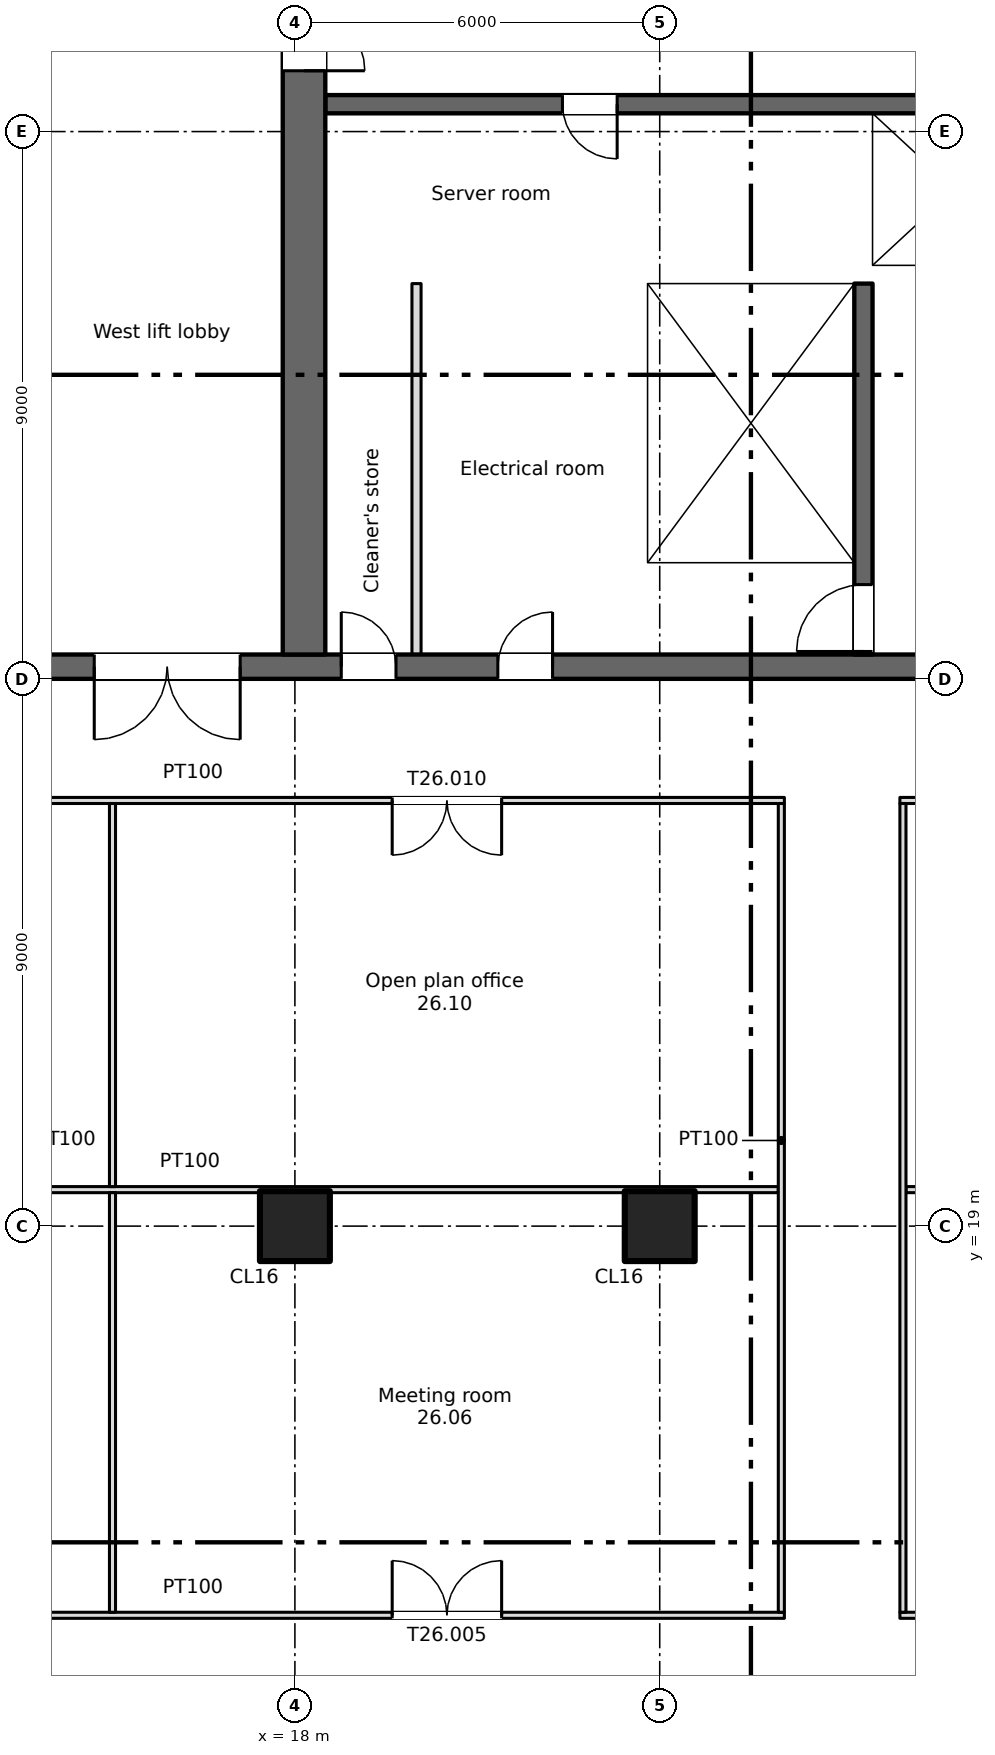
"""IFC4 building model, lengths in metres.
Left out: names, types, materials, properties, quantities, classifications, styles, units other than length and angle.
Written with IfcOpenShell. Run it as: python <this file> out.ifc"""

import sys

from ifc_helpers import new_model, si_unit, direction, frame, frame_2d, origin, origin_2d, place, context, subcontext, project, spatial, rectangle, extrude, element, fill, save


model = new_model("IFC4")
c1 = context("Model", 3, precision=1e-05, world=origin(), true_north=direction((0.0, 1.0)))
c2 = subcontext(c1, "Body", "Model", "MODEL_VIEW")
j1 = project(units=[si_unit("LENGTHUNIT", "METRE"), si_unit("PLANEANGLEUNIT", "RADIAN")], contexts=[c1])
p1 = place(None, origin())
s1 = spatial("IfcSite", under=j1, at=p1, CompositionType="ELEMENT")
p2 = place(p1, origin())
s2 = spatial("IfcBuilding", under=s1, at=p2, CompositionType="ELEMENT")
p3 = place(p2, frame((0.0, 0.0, 178.0)))
s3 = spatial("IfcBuildingStorey", under=s2, at=p3, CompositionType="ELEMENT", Elevation=178.0)
for number, where, z_axis, x_axis in (
    (1, (18.0, 19.0, 0.0), (0.0, 0.0, 1.0), (1.0, 0.0, 0.0)),
    (2, (24.0, 19.0, 0.0), (0.0, 0.0, 1.0), (1.0, 0.0, 0.0)),
):
    element("IfcColumn", number, at=place(p3, frame(where, z_axis=z_axis, x_axis=x_axis)), inside=s3, PredefinedType="COLUMN", context=c2, shape_type="SweptSolid", body=[
        extrude(rectangle(XDim=1.15, YDim=1.15, at=origin_2d()), origin(), (0.0, 0.0, 1.0), 3.35),
    ])
p4 = place(p3, frame((6.6, 28.2, 0.0), z_axis=(0.0, 0.0, 1.0), x_axis=(1.0, 0.0, 0.0)))
e3 = element("IfcWall", 3, at=p4, inside=s3, PredefinedType="SHEAR", context=c2, shape_type="SweptSolid", body=[
    extrude(rectangle(XDim=57.9, YDim=0.4, at=frame_2d((28.95, 0.0))), origin(), (0.0, 0.0, 1.0), 3.35),
])
p5 = place(p4, frame((12.163, 0.0, 0.0)))
e4 = element("IfcOpeningElement", 4, at=p5, cuts=e3, PredefinedType="OPENING", context=c2, shape_type="SweptSolid", body=[
    extrude(rectangle(XDim=0.9, YDim=2.1, at=frame_2d((0.45, 1.05))), frame((0.0, 0.21, 0.0), z_axis=(0.0, -1.0, 0.0), x_axis=(1.0, 0.0, 0.0)), (0.0, 0.0, 1.0), 0.42),
])
p6 = place(p4, frame((14.738, 0.0, 0.0)))
e5 = element("IfcOpeningElement", 5, at=p6, cuts=e3, PredefinedType="OPENING", context=c2, shape_type="SweptSolid", body=[
    extrude(rectangle(XDim=0.9, YDim=2.1, at=frame_2d((0.45, 1.05))), frame((0.0, 0.21, 0.0), z_axis=(0.0, -1.0, 0.0), x_axis=(1.0, 0.0, 0.0)), (0.0, 0.0, 1.0), 0.42),
])
p7 = place(p4, frame((49.163, 0.0, 0.0)))
e6 = element("IfcOpeningElement", 6, at=p7, cuts=e3, PredefinedType="OPENING", context=c2, shape_type="SweptSolid", body=[
    extrude(rectangle(XDim=0.9, YDim=2.1, at=frame_2d((0.45, 1.05))), frame((0.0, 0.21, 0.0), z_axis=(0.0, -1.0, 0.0), x_axis=(1.0, 0.0, 0.0)), (0.0, 0.0, 1.0), 0.42),
])
p8 = place(p4, frame((51.738, 0.0, 0.0)))
e7 = element("IfcOpeningElement", 7, at=p8, cuts=e3, PredefinedType="OPENING", context=c2, shape_type="SweptSolid", body=[
    extrude(rectangle(XDim=0.9, YDim=2.1, at=frame_2d((0.45, 1.05))), frame((0.0, 0.21, 0.0), z_axis=(0.0, -1.0, 0.0), x_axis=(1.0, 0.0, 0.0)), (0.0, 0.0, 1.0), 0.42),
])
p9 = place(p4, frame((1.45, 0.0, 0.0)))
e8 = element("IfcOpeningElement", 8, at=p9, cuts=e3, PredefinedType="OPENING", context=c2, shape_type="SweptSolid", body=[
    extrude(rectangle(XDim=0.9, YDim=2.1, at=frame_2d((0.45, 1.05))), frame((0.0, 0.21, 0.0), z_axis=(0.0, -1.0, 0.0), x_axis=(1.0, 0.0, 0.0)), (0.0, 0.0, 1.0), 0.42),
])
p10 = place(p4, frame((4.8, 0.0, 0.0)))
e9 = element("IfcOpeningElement", 9, at=p10, cuts=e3, PredefinedType="OPENING", context=c2, shape_type="SweptSolid", body=[
    extrude(rectangle(XDim=1.2, YDim=2.1, at=frame_2d((0.6, 1.05))), frame((0.0, 0.21, 0.0), z_axis=(0.0, -1.0, 0.0), x_axis=(1.0, 0.0, 0.0)), (0.0, 0.0, 1.0), 0.42),
])
p11 = place(p4, frame((31.8, 0.0, 0.0)))
e10 = element("IfcOpeningElement", 10, at=p11, cuts=e3, PredefinedType="OPENING", context=c2, shape_type="SweptSolid", body=[
    extrude(rectangle(XDim=1.2, YDim=2.1, at=frame_2d((0.6, 1.05))), frame((0.0, 0.21, 0.0), z_axis=(0.0, -1.0, 0.0), x_axis=(1.0, 0.0, 0.0)), (0.0, 0.0, 1.0), 0.42),
])
p12 = place(p4, frame((55.3, 0.0, 0.0)))
e11 = element("IfcOpeningElement", 11, at=p12, cuts=e3, PredefinedType="OPENING", context=c2, shape_type="SweptSolid", body=[
    extrude(rectangle(XDim=1.2, YDim=2.1, at=frame_2d((0.6, 1.05))), frame((0.0, 0.21, 0.0), z_axis=(0.0, -1.0, 0.0), x_axis=(1.0, 0.0, 0.0)), (0.0, 0.0, 1.0), 0.42),
])
p13 = place(p4, frame((21.8, 0.0, 0.0)))
e12 = element("IfcOpeningElement", 12, at=p13, cuts=e3, PredefinedType="OPENING", context=c2, shape_type="SweptSolid", body=[
    extrude(rectangle(XDim=1.2, YDim=2.1, at=frame_2d((0.6, 1.05))), frame((0.0, 0.21, 0.0), z_axis=(0.0, -1.0, 0.0), x_axis=(1.0, 0.0, 0.0)), (0.0, 0.0, 1.0), 0.42),
])
p14 = place(p4, frame((41.8, 0.0, 0.0)))
e13 = element("IfcOpeningElement", 13, at=p14, cuts=e3, PredefinedType="OPENING", context=c2, shape_type="SweptSolid", body=[
    extrude(rectangle(XDim=1.2, YDim=2.1, at=frame_2d((0.6, 1.05))), frame((0.0, 0.21, 0.0), z_axis=(0.0, -1.0, 0.0), x_axis=(1.0, 0.0, 0.0)), (0.0, 0.0, 1.0), 0.42),
])
p15 = place(p4, frame((24.95, 0.0, 0.0)))
e14 = element("IfcOpeningElement", 14, at=p15, cuts=e3, PredefinedType="OPENING", context=c2, shape_type="SweptSolid", body=[
    extrude(rectangle(XDim=2.4, YDim=2.1, at=frame_2d((1.2, 1.05))), frame((0.0, 0.21, 0.0), z_axis=(0.0, -1.0, 0.0), x_axis=(1.0, 0.0, 0.0)), (0.0, 0.0, 1.0), 0.42),
])
p16 = place(p4, frame((37.45, 0.0, 0.0)))
e15 = element("IfcOpeningElement", 15, at=p16, cuts=e3, PredefinedType="OPENING", context=c2, shape_type="SweptSolid", body=[
    extrude(rectangle(XDim=2.4, YDim=2.1, at=frame_2d((1.2, 1.05))), frame((0.0, 0.21, 0.0), z_axis=(0.0, -1.0, 0.0), x_axis=(1.0, 0.0, 0.0)), (0.0, 0.0, 1.0), 0.42),
])
p17 = place(p4, frame((8.1, 0.0, 0.0)))
e16 = element("IfcOpeningElement", 16, at=p17, cuts=e3, PredefinedType="OPENING", context=c2, shape_type="SweptSolid", body=[
    extrude(rectangle(XDim=2.4, YDim=2.1, at=frame_2d((1.2, 1.05))), frame((0.0, 0.21, 0.0), z_axis=(0.0, -1.0, 0.0), x_axis=(1.0, 0.0, 0.0)), (0.0, 0.0, 1.0), 0.42),
])
p18 = place(p4, frame((28.95, 0.0, 0.0)))
e17 = element("IfcOpeningElement", 17, at=p18, cuts=e3, PredefinedType="OPENING", context=c2, shape_type="SweptSolid", body=[
    extrude(rectangle(XDim=0.9, YDim=2.1, at=frame_2d((0.45, 1.05))), frame((0.0, 0.21, 0.0), z_axis=(0.0, -1.0, 0.0), x_axis=(1.0, 0.0, 0.0)), (0.0, 0.0, 1.0), 0.42),
])
p19 = place(p4, frame((34.95, 0.0, 0.0)))
e18 = element("IfcOpeningElement", 18, at=p19, cuts=e3, PredefinedType="OPENING", context=c2, shape_type="SweptSolid", body=[
    extrude(rectangle(XDim=0.9, YDim=2.1, at=frame_2d((0.45, 1.05))), frame((0.0, 0.21, 0.0), z_axis=(0.0, -1.0, 0.0), x_axis=(1.0, 0.0, 0.0)), (0.0, 0.0, 1.0), 0.42),
])
p20 = place(p3, frame((18.15, 28.4, 0.0), z_axis=(0.0, 0.0, 1.0), x_axis=(0.0, 1.0, 0.0)))
e19 = element("IfcWall", 19, at=p20, inside=s3, PredefinedType="SHEAR", context=c2, shape_type="SweptSolid", body=[
    extrude(rectangle(XDim=16.9, YDim=0.7, at=frame_2d((8.45, 0.0))), origin(), (0.0, 0.0, 1.0), 3.35),
])
p21 = place(p20, frame((9.6, 0.0, 0.0)))
e20 = element("IfcOpeningElement", 20, at=p21, cuts=e19, PredefinedType="OPENING", context=c2, shape_type="SweptSolid", body=[
    extrude(rectangle(XDim=2.0, YDim=2.1, at=frame_2d((1.0, 1.05))), frame((0.0, 0.36, 0.0), z_axis=(0.0, -1.0, 0.0), x_axis=(1.0, 0.0, 0.0)), (0.0, 0.0, 1.0), 0.72),
])
p22 = place(p20, frame((15.4, 0.0, 0.0)))
e21 = element("IfcOpeningElement", 21, at=p22, cuts=e19, PredefinedType="OPENING", context=c2, shape_type="SweptSolid", body=[
    extrude(rectangle(XDim=1.2, YDim=2.1, at=frame_2d((0.6, 1.05))), frame((0.0, 0.36, 0.0), z_axis=(0.0, -1.0, 0.0), x_axis=(1.0, 0.0, 0.0)), (0.0, 0.0, 1.0), 0.72),
])
for number, where, z_axis, x_axis in (
    (22, (13.85, 28.4, 0.0), (0.0, 0.0, 1.0), (0.0, 1.0, 0.0)),
    (23, (23.65, 28.4, 0.0), (0.0, 0.0, 1.0), (0.0, 1.0, 0.0)),
):
    element("IfcWall", number, at=place(p3, frame(where, z_axis=z_axis, x_axis=x_axis)), inside=s3, PredefinedType="SHEAR", context=c2, shape_type="SweptSolid", body=[
        extrude(rectangle(XDim=6.1, YDim=0.3, at=frame_2d((3.05, 0.0))), origin(), (0.0, 0.0, 1.0), 3.35),
    ])
p23 = place(p3, frame((27.35, 28.4, 0.0), z_axis=(0.0, 0.0, 1.0), x_axis=(0.0, 1.0, 0.0)))
e24 = element("IfcWall", 24, at=p23, inside=s3, PredefinedType="SHEAR", context=c2, shape_type="SweptSolid", body=[
    extrude(rectangle(XDim=6.1, YDim=0.3, at=frame_2d((3.05, 0.0))), origin(), (0.0, 0.0, 1.0), 3.35),
])
p24 = place(p23, frame((0.05, 0.0, 0.0)))
e25 = element("IfcOpeningElement", 25, at=p24, cuts=e24, PredefinedType="OPENING", context=c2, shape_type="SweptSolid", body=[
    extrude(rectangle(XDim=1.1, YDim=2.1, at=frame_2d((0.55, 1.05))), frame((0.0, 0.16, 0.0), z_axis=(0.0, -1.0, 0.0), x_axis=(1.0, 0.0, 0.0)), (0.0, 0.0, 1.0), 0.32),
])
p25 = place(p3, frame((18.5, 34.65, 0.0), z_axis=(0.0, 0.0, 1.0), x_axis=(1.0, 0.0, 0.0)))
e26 = element("IfcWall", 26, at=p25, inside=s3, PredefinedType="SHEAR", context=c2, shape_type="SweptSolid", body=[
    extrude(rectangle(XDim=12.2, YDim=0.3, at=frame_2d((6.1, 0.0))), origin(), (0.0, 0.0, 1.0), 3.35),
])
p26 = place(p25, frame((9.8, 0.0, 0.0)))
e27 = element("IfcOpeningElement", 27, at=p26, cuts=e26, PredefinedType="OPENING", context=c2, shape_type="SweptSolid", body=[
    extrude(rectangle(XDim=1.1, YDim=2.1, at=frame_2d((0.55, 1.05))), frame((0.0, 0.16, 0.0), z_axis=(0.0, -1.0, 0.0), x_axis=(1.0, 0.0, 0.0)), (0.0, 0.0, 1.0), 0.32),
])
p27 = place(p3, frame((30.7, 37.45, 0.0), z_axis=(0.0, 0.0, 1.0), x_axis=(-1.0, 0.0, 0.0)))
e28 = element("IfcWall", 28, at=p27, inside=s3, PredefinedType="SHEAR", context=c2, shape_type="SweptSolid", body=[
    extrude(rectangle(XDim=12.2, YDim=0.3, at=frame_2d((6.1, 0.0))), origin(), (0.0, 0.0, 1.0), 3.35),
])
p28 = place(p27, frame((7.4, 0.0, 0.0)))
e29 = element("IfcOpeningElement", 29, at=p28, cuts=e28, PredefinedType="OPENING", context=c2, shape_type="SweptSolid", body=[
    extrude(rectangle(XDim=0.9, YDim=2.1, at=frame_2d((0.45, 1.05))), frame((0.0, 0.16, 0.0), z_axis=(0.0, -1.0, 0.0), x_axis=(1.0, 0.0, 0.0)), (0.0, 0.0, 1.0), 0.32),
])
for number, where, z_axis, x_axis in (
    (30, (27.35, 34.8, 0.0), (0.0, 0.0, 1.0), (0.0, 1.0, 0.0)),
    (31, (13.85, 34.8, 0.0), (0.0, 0.0, 1.0), (0.0, 1.0, 0.0)),
):
    element("IfcWall", number, at=place(p3, frame(where, z_axis=z_axis, x_axis=x_axis)), inside=s3, PredefinedType="SHEAR", context=c2, shape_type="SweptSolid", body=[
        extrude(rectangle(XDim=2.5, YDim=0.3, at=frame_2d((1.25, 0.0))), origin(), (0.0, 0.0, 1.0), 3.35),
    ])
p29 = place(p3, frame((20.0, 28.4, 0.0), z_axis=(0.0, 0.0, 1.0), x_axis=(0.0, 1.0, 0.0)))
e32 = element("IfcWall", 32, at=p29, inside=s3, PredefinedType="PARTITIONING", context=c2, shape_type="SweptSolid", body=[
    extrude(rectangle(XDim=6.1, YDim=0.15, at=frame_2d((3.05, 0.0))), origin(), (0.0, 0.0, 1.0), 3.35),
])
p30 = place(p3, frame((6.6, 12.6, 0.0), z_axis=(0.0, 0.0, 1.0), x_axis=(1.0, 0.0, 0.0)))
e33 = element("IfcWall", 33, at=p30, inside=s3, PredefinedType="PARTITIONING", context=c2, shape_type="SweptSolid", body=[
    extrude(rectangle(XDim=19.45, YDim=0.1, at=frame_2d((9.725, 0.0))), origin(), (0.0, 0.0, 1.0), 3.35),
])
p31 = place(p30, frame((3.7, 0.0, 0.0)))
e34 = element("IfcOpeningElement", 34, at=p31, cuts=e33, PredefinedType="OPENING", context=c2, shape_type="SweptSolid", body=[
    extrude(rectangle(XDim=1.0, YDim=2.1, at=frame_2d((0.5, 1.05))), frame((0.0, 0.06, 0.0), z_axis=(0.0, -1.0, 0.0), x_axis=(1.0, 0.0, 0.0)), (0.0, 0.0, 1.0), 0.12),
])
p32 = place(p30, frame((13.0, 0.0, 0.0)))
e35 = element("IfcOpeningElement", 35, at=p32, cuts=e33, PredefinedType="OPENING", context=c2, shape_type="SweptSolid", body=[
    extrude(rectangle(XDim=1.8, YDim=2.1, at=frame_2d((0.9, 1.05))), frame((0.0, 0.06, 0.0), z_axis=(0.0, -1.0, 0.0), x_axis=(1.0, 0.0, 0.0)), (0.0, 0.0, 1.0), 0.12),
])
p33 = place(p3, frame((27.95, 12.6, 0.0), z_axis=(0.0, 0.0, 1.0), x_axis=(1.0, 0.0, 0.0)))
e36 = element("IfcWall", 36, at=p33, inside=s3, PredefinedType="PARTITIONING", context=c2, shape_type="SweptSolid", body=[
    extrude(rectangle(XDim=22.1, YDim=0.1, at=frame_2d((11.05, 0.0))), origin(), (0.0, 0.0, 1.0), 3.35),
])
p34 = place(p33, frame((4.95, 0.0, 0.0)))
e37 = element("IfcOpeningElement", 37, at=p34, cuts=e36, PredefinedType="OPENING", context=c2, shape_type="SweptSolid", body=[
    extrude(rectangle(XDim=1.2, YDim=2.1, at=frame_2d((0.6, 1.05))), frame((0.0, 0.06, 0.0), z_axis=(0.0, -1.0, 0.0), x_axis=(1.0, 0.0, 0.0)), (0.0, 0.0, 1.0), 0.12),
])
p35 = place(p33, frame((15.95, 0.0, 0.0)))
e38 = element("IfcOpeningElement", 38, at=p35, cuts=e36, PredefinedType="OPENING", context=c2, shape_type="SweptSolid", body=[
    extrude(rectangle(XDim=1.2, YDim=2.1, at=frame_2d((0.6, 1.05))), frame((0.0, 0.06, 0.0), z_axis=(0.0, -1.0, 0.0), x_axis=(1.0, 0.0, 0.0)), (0.0, 0.0, 1.0), 0.12),
])
p36 = place(p3, frame((6.6, 19.6, 0.0), z_axis=(0.0, 0.0, 1.0), x_axis=(1.0, 0.0, 0.0)))
e39 = element("IfcWall", 39, at=p36, inside=s3, PredefinedType="PARTITIONING", context=c2, shape_type="SweptSolid", body=[
    extrude(rectangle(XDim=19.35, YDim=0.1, at=frame_2d((9.675, 0.0))), origin(), (0.0, 0.0, 1.0), 3.35),
])
p37 = place(p3, frame((28.05, 19.6, 0.0), z_axis=(0.0, 0.0, 1.0), x_axis=(1.0, 0.0, 0.0)))
e40 = element("IfcWall", 40, at=p37, inside=s3, PredefinedType="PARTITIONING", context=c2, shape_type="SweptSolid", body=[
    extrude(rectangle(XDim=21.9, YDim=0.1, at=frame_2d((10.95, 0.0))), origin(), (0.0, 0.0, 1.0), 3.35),
])
p38 = place(p3, frame((6.6, 26.0, 0.0), z_axis=(0.0, 0.0, 1.0), x_axis=(1.0, 0.0, 0.0)))
e41 = element("IfcWall", 41, at=p38, inside=s3, PredefinedType="PARTITIONING", context=c2, shape_type="SweptSolid", body=[
    extrude(rectangle(XDim=19.45, YDim=0.1, at=frame_2d((9.725, 0.0))), origin(), (0.0, 0.0, 1.0), 3.35),
])
p39 = place(p38, frame((3.7, 0.0, 0.0)))
e42 = element("IfcOpeningElement", 42, at=p39, cuts=e41, PredefinedType="OPENING", context=c2, shape_type="SweptSolid", body=[
    extrude(rectangle(XDim=1.0, YDim=2.1, at=frame_2d((0.5, 1.05))), frame((0.0, 0.06, 0.0), z_axis=(0.0, -1.0, 0.0), x_axis=(1.0, 0.0, 0.0)), (0.0, 0.0, 1.0), 0.12),
])
p40 = place(p38, frame((13.0, 0.0, 0.0)))
e43 = element("IfcOpeningElement", 43, at=p40, cuts=e41, PredefinedType="OPENING", context=c2, shape_type="SweptSolid", body=[
    extrude(rectangle(XDim=1.8, YDim=2.1, at=frame_2d((0.9, 1.05))), frame((0.0, 0.06, 0.0), z_axis=(0.0, -1.0, 0.0), x_axis=(1.0, 0.0, 0.0)), (0.0, 0.0, 1.0), 0.12),
])
p41 = place(p3, frame((27.95, 26.0, 0.0), z_axis=(0.0, 0.0, 1.0), x_axis=(1.0, 0.0, 0.0)))
e44 = element("IfcWall", 44, at=p41, inside=s3, PredefinedType="PARTITIONING", context=c2, shape_type="SweptSolid", body=[
    extrude(rectangle(XDim=22.1, YDim=0.1, at=frame_2d((11.05, 0.0))), origin(), (0.0, 0.0, 1.0), 3.35),
])
p42 = place(p41, frame((10.15, 0.0, 0.0)))
e45 = element("IfcOpeningElement", 45, at=p42, cuts=e44, PredefinedType="OPENING", context=c2, shape_type="SweptSolid", body=[
    extrude(rectangle(XDim=1.8, YDim=2.1, at=frame_2d((0.9, 1.05))), frame((0.0, 0.06, 0.0), z_axis=(0.0, -1.0, 0.0), x_axis=(1.0, 0.0, 0.0)), (0.0, 0.0, 1.0), 0.12),
])
p43 = place(p3, frame((15.0, 12.65, 0.0), z_axis=(0.0, 0.0, 1.0), x_axis=(0.0, 1.0, 0.0)))
e46 = element("IfcWall", 46, at=p43, inside=s3, PredefinedType="PARTITIONING", context=c2, shape_type="SweptSolid", body=[
    extrude(rectangle(XDim=6.9, YDim=0.1, at=frame_2d((3.45, 0.0))), origin(), (0.0, 0.0, 1.0), 3.35),
])
p44 = place(p3, frame((15.0, 19.65, 0.0), z_axis=(0.0, 0.0, 1.0), x_axis=(0.0, 1.0, 0.0)))
e47 = element("IfcWall", 47, at=p44, inside=s3, PredefinedType="PARTITIONING", context=c2, shape_type="SweptSolid", body=[
    extrude(rectangle(XDim=6.3, YDim=0.1, at=frame_2d((3.15, 0.0))), origin(), (0.0, 0.0, 1.0), 3.35),
])
for number, where, z_axis, x_axis in (
    (48, (26.0, 12.65, 0.0), (0.0, 0.0, 1.0), (0.0, 1.0, 0.0)),
    (49, (28.0, 12.65, 0.0), (0.0, 0.0, 1.0), (0.0, 1.0, 0.0)),
):
    element("IfcWall", number, at=place(p3, frame(where, z_axis=z_axis, x_axis=x_axis)), inside=s3, PredefinedType="PARTITIONING", context=c2, shape_type="SweptSolid", body=[
        extrude(rectangle(XDim=13.3, YDim=0.1, at=frame_2d((6.65, 0.0))), origin(), (0.0, 0.0, 1.0), 3.35),
    ])
p45 = place(p5, origin())
e50 = element("IfcDoor", 50, at=p45, inside=s3, OperationType="SINGLE_SWING_LEFT", PredefinedType="DOOR", context=c2, shape_type="SweptSolid", body=[
    extrude(rectangle(XDim=0.9, YDim=2.1, at=frame_2d((0.45, 1.05))), frame((0.0, 0.025, 0.0), z_axis=(0.0, -1.0, 0.0), x_axis=(1.0, 0.0, 0.0)), (0.0, 0.0, 1.0), 0.05),
])
fill(e4, e50)
p46 = place(p6, origin())
e51 = element("IfcDoor", 51, at=p46, inside=s3, OperationType="SINGLE_SWING_RIGHT", PredefinedType="DOOR", context=c2, shape_type="SweptSolid", body=[
    extrude(rectangle(XDim=0.9, YDim=2.1, at=frame_2d((0.45, 1.05))), frame((0.0, 0.025, 0.0), z_axis=(0.0, -1.0, 0.0), x_axis=(1.0, 0.0, 0.0)), (0.0, 0.0, 1.0), 0.05),
])
fill(e5, e51)
p47 = place(p28, origin())
e52 = element("IfcDoor", 52, at=p47, inside=s3, OperationType="SINGLE_SWING_LEFT", PredefinedType="DOOR", context=c2, shape_type="SweptSolid", body=[
    extrude(rectangle(XDim=0.9, YDim=2.1, at=frame_2d((0.45, 1.05))), frame((0.0, 0.025, 0.0), z_axis=(0.0, -1.0, 0.0), x_axis=(1.0, 0.0, 0.0)), (0.0, 0.0, 1.0), 0.05),
])
fill(e29, e52)
p48 = place(p24, origin())
e53 = element("IfcDoor", 53, at=p48, inside=s3, OperationType="SINGLE_SWING_LEFT", PredefinedType="DOOR", context=c2, shape_type="SweptSolid", body=[
    extrude(rectangle(XDim=1.1, YDim=2.1, at=frame_2d((0.55, 1.05))), frame((0.0, 0.025, 0.0), z_axis=(0.0, -1.0, 0.0), x_axis=(1.0, 0.0, 0.0)), (0.0, 0.0, 1.0), 0.05),
])
fill(e25, e53)
p49 = place(p17, origin())
e54 = element("IfcDoor", 54, at=p49, inside=s3, OperationType="DOUBLE_DOOR_SINGLE_SWING", PredefinedType="DOOR", context=c2, shape_type="SweptSolid", body=[
    extrude(rectangle(XDim=2.4, YDim=2.1, at=frame_2d((1.2, 1.05))), frame((0.0, 0.025, 0.0), z_axis=(0.0, -1.0, 0.0), x_axis=(1.0, 0.0, 0.0)), (0.0, 0.0, 1.0), 0.05),
])
fill(e16, e54)
p50 = place(p21, origin())
e55 = element("IfcDoor", 55, at=p50, inside=s3, OperationType="DOUBLE_DOOR_SINGLE_SWING", PredefinedType="DOOR", context=c2, shape_type="SweptSolid", body=[
    extrude(rectangle(XDim=2.0, YDim=2.1, at=frame_2d((1.0, 1.05))), frame((0.0, 0.025, 0.0), z_axis=(0.0, -1.0, 0.0), x_axis=(1.0, 0.0, 0.0)), (0.0, 0.0, 1.0), 0.05),
])
fill(e20, e55)
p51 = place(p32, origin())
e56 = element("IfcDoor", 56, at=p51, inside=s3, OperationType="DOUBLE_DOOR_SINGLE_SWING", PredefinedType="DOOR", context=c2, shape_type="SweptSolid", body=[
    extrude(rectangle(XDim=1.8, YDim=2.1, at=frame_2d((0.9, 1.05))), frame((0.0, 0.025, 0.0), z_axis=(0.0, -1.0, 0.0), x_axis=(1.0, 0.0, 0.0)), (0.0, 0.0, 1.0), 0.05),
])
fill(e35, e56)
p52 = place(p40, origin())
e57 = element("IfcDoor", 57, at=p52, inside=s3, OperationType="DOUBLE_DOOR_SINGLE_SWING", PredefinedType="DOOR", context=c2, shape_type="SweptSolid", body=[
    extrude(rectangle(XDim=1.8, YDim=2.1, at=frame_2d((0.9, 1.05))), frame((0.0, 0.025, 0.0), z_axis=(0.0, -1.0, 0.0), x_axis=(1.0, 0.0, 0.0)), (0.0, 0.0, 1.0), 0.05),
])
fill(e43, e57)
save(model, sys.argv[1])
